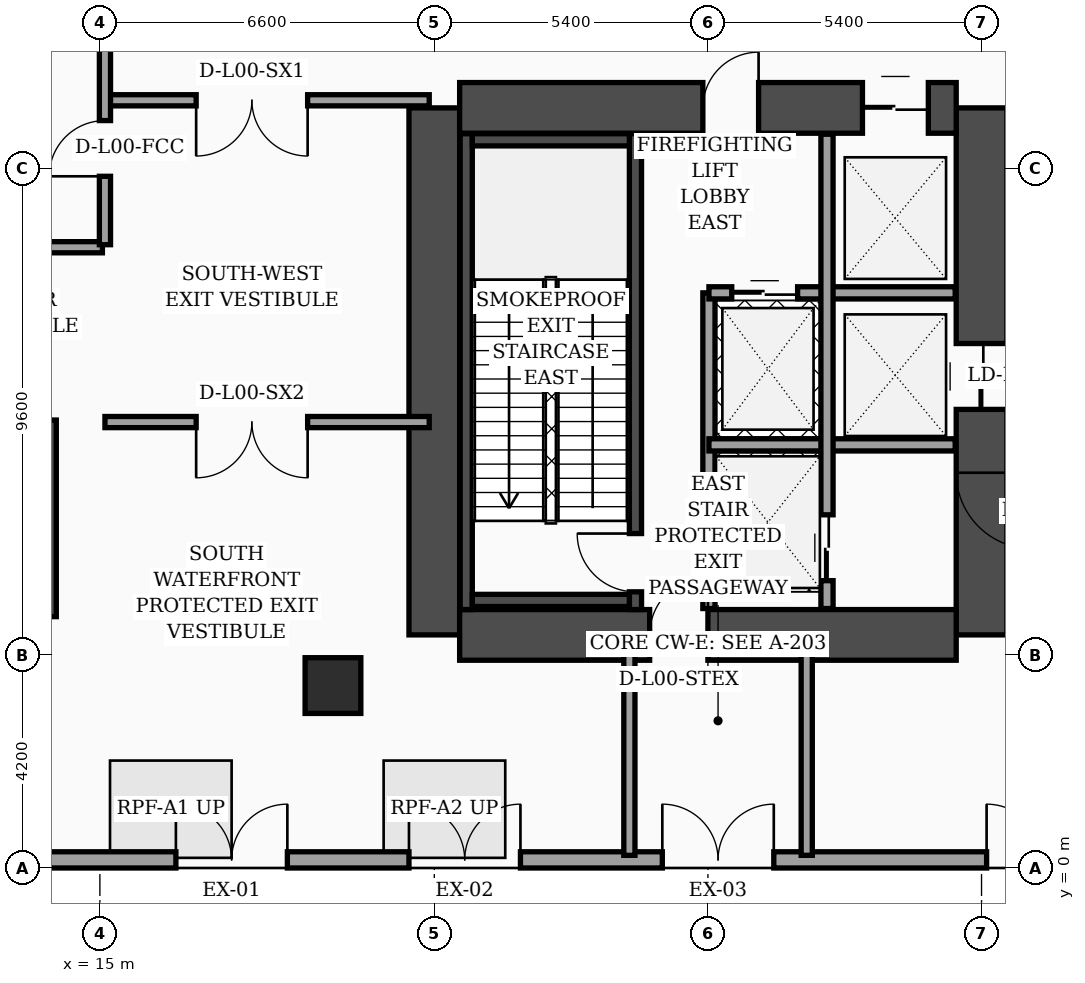
"""IFC4 building model, lengths in metres.
Left out: names, types, materials, properties, quantities, classifications, styles, units other than length and angle.
Written with IfcOpenShell. Run it as: python <this file> out.ifc"""

import sys

from ifc_helpers import new_model, si_unit, direction, frame, frame_2d, origin, origin_2d, place, context, subcontext, project, spatial, rectangle, hollow_rectangle, extrude, element, fill, save


model = new_model("IFC4")
c1 = context("Model", 3, precision=1e-05, world=origin(), true_north=direction((0.0, 1.0)))
c2 = subcontext(c1, "Body", "Model", "MODEL_VIEW")
j1 = project(units=[si_unit("LENGTHUNIT", "METRE"), si_unit("PLANEANGLEUNIT", "RADIAN")], contexts=[c1])
p1 = place(None, origin())
s1 = spatial("IfcSite", under=j1, at=p1, CompositionType="ELEMENT")
p2 = place(p1, origin())
s2 = spatial("IfcBuilding", under=s1, at=p2, CompositionType="ELEMENT")
p3 = place(p2, origin())
s3 = spatial("IfcBuildingStorey", under=s2, at=p3, CompositionType="ELEMENT", Elevation=0.0)
p4 = place(p3, frame((21.6, 4.6, 0.0), z_axis=(0.0, 0.0, 1.0), x_axis=(0.0, 1.0, 0.0)))
e1 = element("IfcWall", 1, at=p4, inside=s3, PredefinedType="SHEAR", context=c2, shape_type="SweptSolid", body=[
    extrude(rectangle(XDim=10.4, YDim=1.0, at=frame_2d((5.2, 0.0))), origin(), (0.0, 0.0, 1.0), 5.68),
])
p5 = place(p3, frame((32.4, 4.6, 0.0), z_axis=(0.0, 0.0, 1.0), x_axis=(0.0, 1.0, 0.0)))
e2 = element("IfcWall", 2, at=p5, inside=s3, PredefinedType="SHEAR", context=c2, shape_type="SweptSolid", body=[
    extrude(rectangle(XDim=10.4, YDim=1.0, at=frame_2d((5.2, 0.0))), origin(), (0.0, 0.0, 1.0), 5.68),
])
p6 = place(p5, frame((4.45, 0.0, 0.0)))
e3 = element("IfcOpeningElement", 3, at=p6, cuts=e2, PredefinedType="OPENING", context=c2, shape_type="SweptSolid", body=[
    extrude(rectangle(XDim=1.3, YDim=2.35, at=frame_2d((0.65, 1.175))), frame((0.0, 0.51, 0.0), z_axis=(0.0, -1.0, 0.0), x_axis=(1.0, 0.0, 0.0)), (0.0, 0.0, 1.0), 1.02),
])
p7 = place(p3, frame((22.1, 15.0, 0.0), z_axis=(0.0, 0.0, 1.0), x_axis=(1.0, 0.0, 0.0)))
e4 = element("IfcWall", 4, at=p7, inside=s3, PredefinedType="SHEAR", context=c2, shape_type="SweptSolid", body=[
    extrude(rectangle(XDim=9.8, YDim=1.0, at=frame_2d((4.9, 0.0))), origin(), (0.0, 0.0, 1.0), 5.68),
])
p8 = place(p7, frame((4.8, 0.0, 0.0)))
e5 = element("IfcOpeningElement", 5, at=p8, cuts=e4, PredefinedType="OPENING", context=c2, shape_type="SweptSolid", body=[
    extrude(rectangle(XDim=1.1, YDim=2.2, at=frame_2d((0.55, 1.1))), frame((0.0, 0.51, 0.0), z_axis=(0.0, -1.0, 0.0), x_axis=(1.0, 0.0, 0.0)), (0.0, 0.0, 1.0), 1.02),
])
p9 = place(p7, frame((7.95, 0.0, 0.0)))
e6 = element("IfcOpeningElement", 6, at=p9, cuts=e4, PredefinedType="OPENING", context=c2, shape_type="SweptSolid", body=[
    extrude(rectangle(XDim=1.3, YDim=2.35, at=frame_2d((0.65, 1.175))), frame((0.0, 0.51, 0.0), z_axis=(0.0, -1.0, 0.0), x_axis=(1.0, 0.0, 0.0)), (0.0, 0.0, 1.0), 1.02),
])
p10 = place(p3, frame((22.1, 4.6, 0.0), z_axis=(0.0, 0.0, 1.0), x_axis=(1.0, 0.0, 0.0)))
e7 = element("IfcWall", 7, at=p10, inside=s3, PredefinedType="SHEAR", context=c2, shape_type="SweptSolid", body=[
    extrude(rectangle(XDim=9.8, YDim=1.0, at=frame_2d((4.9, 0.0))), origin(), (0.0, 0.0, 1.0), 5.68),
])
p11 = place(p10, frame((3.75, 0.0, 0.0)))
e8 = element("IfcOpeningElement", 8, at=p11, cuts=e7, PredefinedType="OPENING", context=c2, shape_type="SweptSolid", body=[
    extrude(rectangle(XDim=1.15, YDim=2.2, at=frame_2d((0.575, 1.1))), frame((0.0, 0.51, 0.0), z_axis=(0.0, -1.0, 0.0), x_axis=(1.0, 0.0, 0.0)), (0.0, 0.0, 1.0), 1.02),
])
p12 = place(p3, frame((22.23, 5.1, 0.0), z_axis=(0.0, 0.0, 1.0), x_axis=(0.0, 1.0, 0.0)))
e9 = element("IfcWall", 9, at=p12, inside=s3, PredefinedType="SOLIDWALL", context=c2, shape_type="SweptSolid", body=[
    extrude(rectangle(XDim=9.39, YDim=0.24, at=frame_2d((4.695, 0.0))), origin(), (0.0, 0.0, 1.0), 5.68),
])
p13 = place(p3, frame((25.57, 5.1, 0.0), z_axis=(0.0, 0.0, 1.0), x_axis=(0.0, 1.0, 0.0)))
e10 = element("IfcWall", 10, at=p13, inside=s3, PredefinedType="SOLIDWALL", context=c2, shape_type="SweptSolid", body=[
    extrude(rectangle(XDim=9.39, YDim=0.24, at=frame_2d((4.695, 0.0))), origin(), (0.0, 0.0, 1.0), 5.68),
])
p14 = place(p13, frame((0.35, 0.0, 0.0)))
e11 = element("IfcOpeningElement", 11, at=p14, cuts=e10, PredefinedType="OPENING", context=c2, shape_type="SweptSolid", body=[
    extrude(rectangle(XDim=1.15, YDim=2.2, at=frame_2d((0.575, 1.1))), frame((0.0, 0.13, 0.0), z_axis=(0.0, -1.0, 0.0), x_axis=(1.0, 0.0, 0.0)), (0.0, 0.0, 1.0), 0.26),
])
for number, where, z_axis, x_axis in (
    (12, (22.35, 5.28, 0.0), (0.0, 0.0, 1.0), (1.0, 0.0, 0.0)),
    (13, (22.35, 14.37, 0.0), (0.0, 0.0, 1.0), (1.0, 0.0, 0.0)),
):
    element("IfcWall", number, at=place(p3, frame(where, z_axis=z_axis, x_axis=x_axis)), inside=s3, PredefinedType="SOLIDWALL", context=c2, shape_type="SweptSolid", body=[
        extrude(rectangle(XDim=3.1, YDim=0.24, at=frame_2d((1.55, 0.0))), origin(), (0.0, 0.0, 1.0), 5.68),
    ])
p15 = place(p3, frame((14.02, 4.96, 0.0), z_axis=(0.0, 0.0, 1.0), x_axis=(0.0, 1.0, 0.0)))
e14 = element("IfcWall", 14, at=p15, inside=s3, PredefinedType="SOLIDWALL", context=c2, shape_type="SweptSolid", body=[
    extrude(rectangle(XDim=3.88, YDim=0.24, at=frame_2d((1.94, 0.0))), origin(), (0.0, 0.0, 1.0), 5.68),
])
p16 = place(p3, frame((19.6, 3.6, 0.0), z_axis=(0.0, 0.0, 1.0), x_axis=(1.0, 0.0, 0.0)))
e15 = element("IfcColumn", 15, at=p16, inside=s3, PredefinedType="COLUMN", context=c2, shape_type="SweptSolid", body=[
    extrude(hollow_rectangle(XDim=1.1, YDim=1.1, WallThickness=0.045, at=origin_2d()), origin(), (0.0, 0.0, 1.0), 5.68),
])
p17 = place(p3, frame((81.7, 0.16, 0.0), z_axis=(0.0, 0.0, 1.0), x_axis=(-1.0, 0.0, 0.0)))
e16 = element("IfcWall", 16, at=p17, inside=s3, PredefinedType="SOLIDWALL", context=c2, shape_type="SweptSolid", body=[
    extrude(rectangle(XDim=79.4, YDim=0.32, at=frame_2d((39.7, 0.0))), origin(), (0.0, 0.0, 1.0), 5.68),
])
p18 = place(p17, frame((63.0, 0.0, 0.0)))
e17 = element("IfcOpeningElement", 17, at=p18, cuts=e16, PredefinedType="OPENING", context=c2, shape_type="SweptSolid", body=[
    extrude(rectangle(XDim=2.2, YDim=2.5, at=frame_2d((1.1, 1.25))), frame((0.0, 0.17, 0.0), z_axis=(0.0, -1.0, 0.0), x_axis=(1.0, 0.0, 0.0)), (0.0, 0.0, 1.0), 0.34),
])
p19 = place(p17, frame((58.4, 0.0, 0.0)))
e18 = element("IfcOpeningElement", 18, at=p19, cuts=e16, PredefinedType="OPENING", context=c2, shape_type="SweptSolid", body=[
    extrude(rectangle(XDim=2.2, YDim=2.5, at=frame_2d((1.1, 1.25))), frame((0.0, 0.17, 0.0), z_axis=(0.0, -1.0, 0.0), x_axis=(1.0, 0.0, 0.0)), (0.0, 0.0, 1.0), 0.34),
])
p20 = place(p17, frame((53.4, 0.0, 0.0)))
e19 = element("IfcOpeningElement", 19, at=p20, cuts=e16, PredefinedType="OPENING", context=c2, shape_type="SweptSolid", body=[
    extrude(rectangle(XDim=2.2, YDim=2.5, at=frame_2d((1.1, 1.25))), frame((0.0, 0.17, 0.0), z_axis=(0.0, -1.0, 0.0), x_axis=(1.0, 0.0, 0.0)), (0.0, 0.0, 1.0), 0.34),
])
p21 = place(p17, frame((47.0, 0.0, 0.0)))
e20 = element("IfcOpeningElement", 20, at=p21, cuts=e16, PredefinedType="OPENING", context=c2, shape_type="SweptSolid", body=[
    extrude(rectangle(XDim=2.2, YDim=2.5, at=frame_2d((1.1, 1.25))), frame((0.0, 0.17, 0.0), z_axis=(0.0, -1.0, 0.0), x_axis=(1.0, 0.0, 0.0)), (0.0, 0.0, 1.0), 0.34),
])
p22 = place(p17, frame((41.7, 0.0, 0.0)))
e21 = element("IfcOpeningElement", 21, at=p22, cuts=e16, PredefinedType="OPENING", context=c2, shape_type="SweptSolid", body=[
    extrude(rectangle(XDim=2.2, YDim=2.5, at=frame_2d((1.1, 1.25))), frame((0.0, 0.17, 0.0), z_axis=(0.0, -1.0, 0.0), x_axis=(1.0, 0.0, 0.0)), (0.0, 0.0, 1.0), 0.34),
])
p23 = place(p17, frame((36.0, 0.0, 0.0)))
e22 = element("IfcOpeningElement", 22, at=p23, cuts=e16, PredefinedType="OPENING", context=c2, shape_type="SweptSolid", body=[
    extrude(rectangle(XDim=2.2, YDim=2.5, at=frame_2d((1.1, 1.25))), frame((0.0, 0.17, 0.0), z_axis=(0.0, -1.0, 0.0), x_axis=(1.0, 0.0, 0.0)), (0.0, 0.0, 1.0), 0.34),
])
p24 = place(p17, frame((30.2, 0.0, 0.0)))
e23 = element("IfcOpeningElement", 23, at=p24, cuts=e16, PredefinedType="OPENING", context=c2, shape_type="SweptSolid", body=[
    extrude(rectangle(XDim=2.2, YDim=2.5, at=frame_2d((1.1, 1.25))), frame((0.0, 0.17, 0.0), z_axis=(0.0, -1.0, 0.0), x_axis=(1.0, 0.0, 0.0)), (0.0, 0.0, 1.0), 0.34),
])
p25 = place(p17, frame((24.7, 0.0, 0.0)))
e24 = element("IfcOpeningElement", 24, at=p25, cuts=e16, PredefinedType="OPENING", context=c2, shape_type="SweptSolid", body=[
    extrude(rectangle(XDim=2.2, YDim=2.5, at=frame_2d((1.1, 1.25))), frame((0.0, 0.17, 0.0), z_axis=(0.0, -1.0, 0.0), x_axis=(1.0, 0.0, 0.0)), (0.0, 0.0, 1.0), 0.34),
])
p26 = place(p17, frame((71.5, 0.0, 0.8)))
e25 = element("IfcOpeningElement", 25, at=p26, cuts=e16, PredefinedType="OPENING", context=c2, shape_type="SweptSolid", body=[
    extrude(rectangle(XDim=2.4, YDim=2.6, at=frame_2d((1.2, 1.3))), frame((0.0, 0.17, 0.0), z_axis=(0.0, -1.0, 0.0), x_axis=(1.0, 0.0, 0.0)), (0.0, 0.0, 1.0), 0.34),
])
p27 = place(p17, frame((16.5, 0.0, 0.8)))
e26 = element("IfcOpeningElement", 26, at=p27, cuts=e16, PredefinedType="OPENING", context=c2, shape_type="SweptSolid", body=[
    extrude(rectangle(XDim=2.4, YDim=2.6, at=frame_2d((1.2, 1.3))), frame((0.0, 0.17, 0.0), z_axis=(0.0, -1.0, 0.0), x_axis=(1.0, 0.0, 0.0)), (0.0, 0.0, 1.0), 0.34),
])
p28 = place(p17, frame((7.0, 0.0, 0.8)))
e27 = element("IfcOpeningElement", 27, at=p28, cuts=e16, PredefinedType="OPENING", context=c2, shape_type="SweptSolid", body=[
    extrude(rectangle(XDim=2.4, YDim=2.6, at=frame_2d((1.2, 1.3))), frame((0.0, 0.17, 0.0), z_axis=(0.0, -1.0, 0.0), x_axis=(1.0, 0.0, 0.0)), (0.0, 0.0, 1.0), 0.34),
])
p29 = place(p3, frame((27.02, 5.12, 0.0), z_axis=(0.0, 0.0, 1.0), x_axis=(0.0, 1.0, 0.0)))
e28 = element("IfcWall", 28, at=p29, inside=s3, PredefinedType="SOLIDWALL", context=c2, shape_type="SweptSolid", body=[
    extrude(rectangle(XDim=6.23, YDim=0.24, at=frame_2d((3.115, 0.0))), origin(), (0.0, 0.0, 1.0), 5.68),
])
p30 = place(p3, frame((27.02, 11.35, 0.0), z_axis=(0.0, 0.0, 1.0), x_axis=(1.0, 0.0, 0.0)))
e29 = element("IfcWall", 29, at=p30, inside=s3, PredefinedType="SOLIDWALL", context=c2, shape_type="SweptSolid", body=[
    extrude(rectangle(XDim=4.86, YDim=0.24, at=frame_2d((2.43, 0.0))), origin(), (0.0, 0.0, 1.0), 5.68),
])
p31 = place(p30, frame((0.45, 0.0, 0.0)))
e30 = element("IfcOpeningElement", 30, at=p31, cuts=e29, PredefinedType="OPENING", context=c2, shape_type="SweptSolid", body=[
    extrude(rectangle(XDim=1.3, YDim=2.35, at=frame_2d((0.65, 1.175))), frame((0.0, 0.13, 0.0), z_axis=(0.0, -1.0, 0.0), x_axis=(1.0, 0.0, 0.0)), (0.0, 0.0, 1.0), 0.26),
])
p32 = place(p3, frame((27.02, 8.35, 0.0), z_axis=(0.0, 0.0, 1.0), x_axis=(1.0, 0.0, 0.0)))
e31 = element("IfcWall", 31, at=p32, inside=s3, PredefinedType="SOLIDWALL", context=c2, shape_type="SweptSolid", body=[
    extrude(rectangle(XDim=4.86, YDim=0.24, at=frame_2d((2.43, 0.0))), origin(), (0.0, 0.0, 1.0), 5.68),
])
p33 = place(p3, frame((29.35, 5.12, 0.0), z_axis=(0.0, 0.0, 1.0), x_axis=(0.0, 1.0, 0.0)))
e32 = element("IfcWall", 32, at=p33, inside=s3, PredefinedType="SOLIDWALL", context=c2, shape_type="SweptSolid", body=[
    extrude(rectangle(XDim=9.36, YDim=0.24, at=frame_2d((4.68, 0.0))), origin(), (0.0, 0.0, 1.0), 5.68),
])
p34 = place(p33, frame((0.55, 0.0, 0.0)))
e33 = element("IfcOpeningElement", 33, at=p34, cuts=e32, PredefinedType="OPENING", context=c2, shape_type="SweptSolid", body=[
    extrude(rectangle(XDim=1.3, YDim=2.35, at=frame_2d((0.65, 1.175))), frame((0.0, 0.13, 0.0), z_axis=(0.0, -1.0, 0.0), x_axis=(1.0, 0.0, 0.0)), (0.0, 0.0, 1.0), 0.26),
])
p35 = place(p3, frame((0.06, 12.25, 0.0), z_axis=(0.0, 0.0, 1.0), x_axis=(1.0, 0.0, 0.0)))
e34 = element("IfcWall", 34, at=p35, inside=s3, PredefinedType="SOLIDWALL", context=c2, shape_type="SweptSolid", body=[
    extrude(rectangle(XDim=14.99, YDim=0.22, at=frame_2d((7.495, 0.0))), origin(), (0.0, 0.0, 1.0), 4.88),
])
p36 = place(p3, frame((15.1, 15.15, 0.0), z_axis=(0.0, 0.0, 1.0), x_axis=(1.0, 0.0, 0.0)))
e35 = element("IfcWall", 35, at=p36, inside=s3, PredefinedType="SOLIDWALL", context=c2, shape_type="SweptSolid", body=[
    extrude(rectangle(XDim=6.4, YDim=0.22, at=frame_2d((3.2, 0.0))), origin(), (0.0, 0.0, 1.0), 4.48),
])
p37 = place(p36, frame((1.8, 0.0, 0.0)))
e36 = element("IfcOpeningElement", 36, at=p37, cuts=e35, PredefinedType="OPENING", context=c2, shape_type="SweptSolid", body=[
    extrude(rectangle(XDim=2.2, YDim=2.5, at=frame_2d((1.1, 1.25))), frame((0.0, 0.12, 0.0), z_axis=(0.0, -1.0, 0.0), x_axis=(1.0, 0.0, 0.0)), (0.0, 0.0, 1.0), 0.24),
])
p38 = place(p3, frame((15.1, 8.8, 0.0), z_axis=(0.0, 0.0, 1.0), x_axis=(1.0, 0.0, 0.0)))
e37 = element("IfcWall", 37, at=p38, inside=s3, PredefinedType="SOLIDWALL", context=c2, shape_type="SweptSolid", body=[
    extrude(rectangle(XDim=6.4, YDim=0.22, at=frame_2d((3.2, 0.0))), origin(), (0.0, 0.0, 1.0), 5.68),
])
p39 = place(p38, frame((1.8, 0.0, 0.0)))
e38 = element("IfcOpeningElement", 38, at=p39, cuts=e37, PredefinedType="OPENING", context=c2, shape_type="SweptSolid", body=[
    extrude(rectangle(XDim=2.2, YDim=2.5, at=frame_2d((1.1, 1.25))), frame((0.0, 0.12, 0.0), z_axis=(0.0, -1.0, 0.0), x_axis=(1.0, 0.0, 0.0)), (0.0, 0.0, 1.0), 0.24),
])
for number, where, z_axis, x_axis in (
    (39, (25.45, 0.25, 0.0), (0.0, 0.0, 1.0), (0.0, 1.0, 0.0)),
    (40, (28.95, 0.25, 0.0), (0.0, 0.0, 1.0), (0.0, 1.0, 0.0)),
):
    element("IfcWall", number, at=place(p3, frame(where, z_axis=z_axis, x_axis=x_axis)), inside=s3, PredefinedType="SOLIDWALL", context=c2, shape_type="SweptSolid", body=[
        extrude(rectangle(XDim=4.35, YDim=0.22, at=frame_2d((2.175, 0.0))), origin(), (0.0, 0.0, 1.0), 5.18),
    ])
p40 = place(p3, frame((15.1, 12.3, 0.0), z_axis=(0.0, 0.0, 1.0), x_axis=(0.0, 1.0, 0.0)))
e41 = element("IfcWall", 41, at=p40, inside=s3, PredefinedType="SOLIDWALL", context=c2, shape_type="SweptSolid", body=[
    extrude(rectangle(XDim=4.3, YDim=0.22, at=frame_2d((2.15, 0.0))), origin(), (0.0, 0.0, 1.0), 4.48),
])
p41 = place(p40, frame((1.35, 0.0, 0.0)))
e42 = element("IfcOpeningElement", 42, at=p41, cuts=e41, PredefinedType="OPENING", context=c2, shape_type="SweptSolid", body=[
    extrude(rectangle(XDim=1.1, YDim=2.2, at=frame_2d((0.55, 1.1))), frame((0.0, 0.12, 0.0), z_axis=(0.0, -1.0, 0.0), x_axis=(1.0, 0.0, 0.0)), (0.0, 0.0, 1.0), 0.24),
])
p42 = place(p18, origin())
e43 = element("IfcDoor", 43, at=p42, inside=s3, OperationType="DOUBLE_DOOR_SINGLE_SWING", PredefinedType="DOOR", context=c2, shape_type="SweptSolid", body=[
    extrude(rectangle(XDim=2.2, YDim=2.5, at=frame_2d((1.1, 1.25))), frame((0.0, 0.025, 0.0), z_axis=(0.0, -1.0, 0.0), x_axis=(1.0, 0.0, 0.0)), (0.0, 0.0, 1.0), 0.05),
])
fill(e17, e43)
p43 = place(p19, origin())
e44 = element("IfcDoor", 44, at=p43, inside=s3, OperationType="DOUBLE_DOOR_SINGLE_SWING", PredefinedType="DOOR", context=c2, shape_type="SweptSolid", body=[
    extrude(rectangle(XDim=2.2, YDim=2.5, at=frame_2d((1.1, 1.25))), frame((0.0, 0.025, 0.0), z_axis=(0.0, -1.0, 0.0), x_axis=(1.0, 0.0, 0.0)), (0.0, 0.0, 1.0), 0.05),
])
fill(e18, e44)
p44 = place(p20, origin())
e45 = element("IfcDoor", 45, at=p44, inside=s3, OperationType="DOUBLE_DOOR_SINGLE_SWING", PredefinedType="DOOR", context=c2, shape_type="SweptSolid", body=[
    extrude(rectangle(XDim=2.2, YDim=2.5, at=frame_2d((1.1, 1.25))), frame((0.0, 0.025, 0.0), z_axis=(0.0, -1.0, 0.0), x_axis=(1.0, 0.0, 0.0)), (0.0, 0.0, 1.0), 0.05),
])
fill(e19, e45)
p45 = place(p21, origin())
e46 = element("IfcDoor", 46, at=p45, inside=s3, OperationType="DOUBLE_DOOR_SINGLE_SWING", PredefinedType="DOOR", context=c2, shape_type="SweptSolid", body=[
    extrude(rectangle(XDim=2.2, YDim=2.5, at=frame_2d((1.1, 1.25))), frame((0.0, 0.025, 0.0), z_axis=(0.0, -1.0, 0.0), x_axis=(1.0, 0.0, 0.0)), (0.0, 0.0, 1.0), 0.05),
])
fill(e20, e46)
p46 = place(p31, origin())
e47 = element("IfcDoor", 47, at=p46, inside=s3, OperationType="DOUBLE_DOOR_SLIDING", PredefinedType="DOOR", context=c2, shape_type="SweptSolid", body=[
    extrude(rectangle(XDim=1.3, YDim=2.35, at=frame_2d((0.65, 1.175))), frame((0.0, 0.025, 0.0), z_axis=(0.0, -1.0, 0.0), x_axis=(1.0, 0.0, 0.0)), (0.0, 0.0, 1.0), 0.05),
])
fill(e30, e47)
p47 = place(p34, origin())
e48 = element("IfcDoor", 48, at=p47, inside=s3, OperationType="DOUBLE_DOOR_SLIDING", PredefinedType="DOOR", context=c2, shape_type="SweptSolid", body=[
    extrude(rectangle(XDim=1.3, YDim=2.35, at=frame_2d((0.65, 1.175))), frame((0.0, 0.025, 0.0), z_axis=(0.0, -1.0, 0.0), x_axis=(1.0, 0.0, 0.0)), (0.0, 0.0, 1.0), 0.05),
])
fill(e33, e48)
p48 = place(p37, origin())
e49 = element("IfcDoor", 49, at=p48, inside=s3, OperationType="DOUBLE_DOOR_SINGLE_SWING", PredefinedType="DOOR", context=c2, shape_type="SweptSolid", body=[
    extrude(rectangle(XDim=2.2, YDim=2.5, at=frame_2d((1.1, 1.25))), frame((0.0, 0.025, 0.0), z_axis=(0.0, -1.0, 0.0), x_axis=(1.0, 0.0, 0.0)), (0.0, 0.0, 1.0), 0.05),
])
fill(e36, e49)
p49 = place(p39, origin())
e50 = element("IfcDoor", 50, at=p49, inside=s3, OperationType="DOUBLE_DOOR_SINGLE_SWING", PredefinedType="DOOR", context=c2, shape_type="SweptSolid", body=[
    extrude(rectangle(XDim=2.2, YDim=2.5, at=frame_2d((1.1, 1.25))), frame((0.0, 0.025, 0.0), z_axis=(0.0, -1.0, 0.0), x_axis=(1.0, 0.0, 0.0)), (0.0, 0.0, 1.0), 0.05),
])
fill(e38, e50)
p50 = place(p41, origin())
e51 = element("IfcDoor", 51, at=p50, inside=s3, OperationType="SINGLE_SWING_LEFT", PredefinedType="DOOR", context=c2, shape_type="SweptSolid", body=[
    extrude(rectangle(XDim=1.1, YDim=2.2, at=frame_2d((0.55, 1.1))), frame((0.0, 0.025, 0.0), z_axis=(0.0, -1.0, 0.0), x_axis=(1.0, 0.0, 0.0)), (0.0, 0.0, 1.0), 0.05),
])
fill(e42, e51)
p51 = place(p14, origin())
e52 = element("IfcDoor", 52, at=p51, inside=s3, OperationType="SINGLE_SWING_RIGHT", PredefinedType="DOOR", context=c2, shape_type="SweptSolid", body=[
    extrude(rectangle(XDim=1.15, YDim=2.2, at=frame_2d((0.575, 1.1))), frame((0.0, 0.025, 0.0), z_axis=(0.0, -1.0, 0.0), x_axis=(1.0, 0.0, 0.0)), (0.0, 0.0, 1.0), 0.05),
])
fill(e11, e52)
p52 = place(p11, origin())
e53 = element("IfcDoor", 53, at=p52, inside=s3, OperationType="SINGLE_SWING_RIGHT", PredefinedType="DOOR", context=c2, shape_type="SweptSolid", body=[
    extrude(rectangle(XDim=1.15, YDim=2.2, at=frame_2d((0.575, 1.1))), frame((0.0, 0.025, 0.0), z_axis=(0.0, -1.0, 0.0), x_axis=(1.0, 0.0, 0.0)), (0.0, 0.0, 1.0), 0.05),
])
fill(e8, e53)
p53 = place(p8, origin())
e54 = element("IfcDoor", 54, at=p53, inside=s3, OperationType="SINGLE_SWING_RIGHT", PredefinedType="DOOR", context=c2, shape_type="SweptSolid", body=[
    extrude(rectangle(XDim=1.1, YDim=2.2, at=frame_2d((0.55, 1.1))), frame((0.0, 0.025, 0.0), z_axis=(0.0, -1.0, 0.0), x_axis=(1.0, 0.0, 0.0)), (0.0, 0.0, 1.0), 0.05),
])
fill(e5, e54)
p54 = place(p9, origin())
e55 = element("IfcDoor", 55, at=p54, inside=s3, OperationType="DOUBLE_DOOR_SLIDING", PredefinedType="DOOR", context=c2, shape_type="SweptSolid", body=[
    extrude(rectangle(XDim=1.3, YDim=2.35, at=frame_2d((0.65, 1.175))), frame((0.0, 0.025, 0.0), z_axis=(0.0, -1.0, 0.0), x_axis=(1.0, 0.0, 0.0)), (0.0, 0.0, 1.0), 0.05),
])
fill(e6, e55)
p55 = place(p6, origin())
e56 = element("IfcDoor", 56, at=p55, inside=s3, OperationType="DOUBLE_DOOR_SLIDING", PredefinedType="DOOR", context=c2, shape_type="SweptSolid", body=[
    extrude(rectangle(XDim=1.3, YDim=2.35, at=frame_2d((0.65, 1.175))), frame((0.0, 0.025, 0.0), z_axis=(0.0, -1.0, 0.0), x_axis=(1.0, 0.0, 0.0)), (0.0, 0.0, 1.0), 0.05),
])
fill(e3, e56)
save(model, sys.argv[1])
